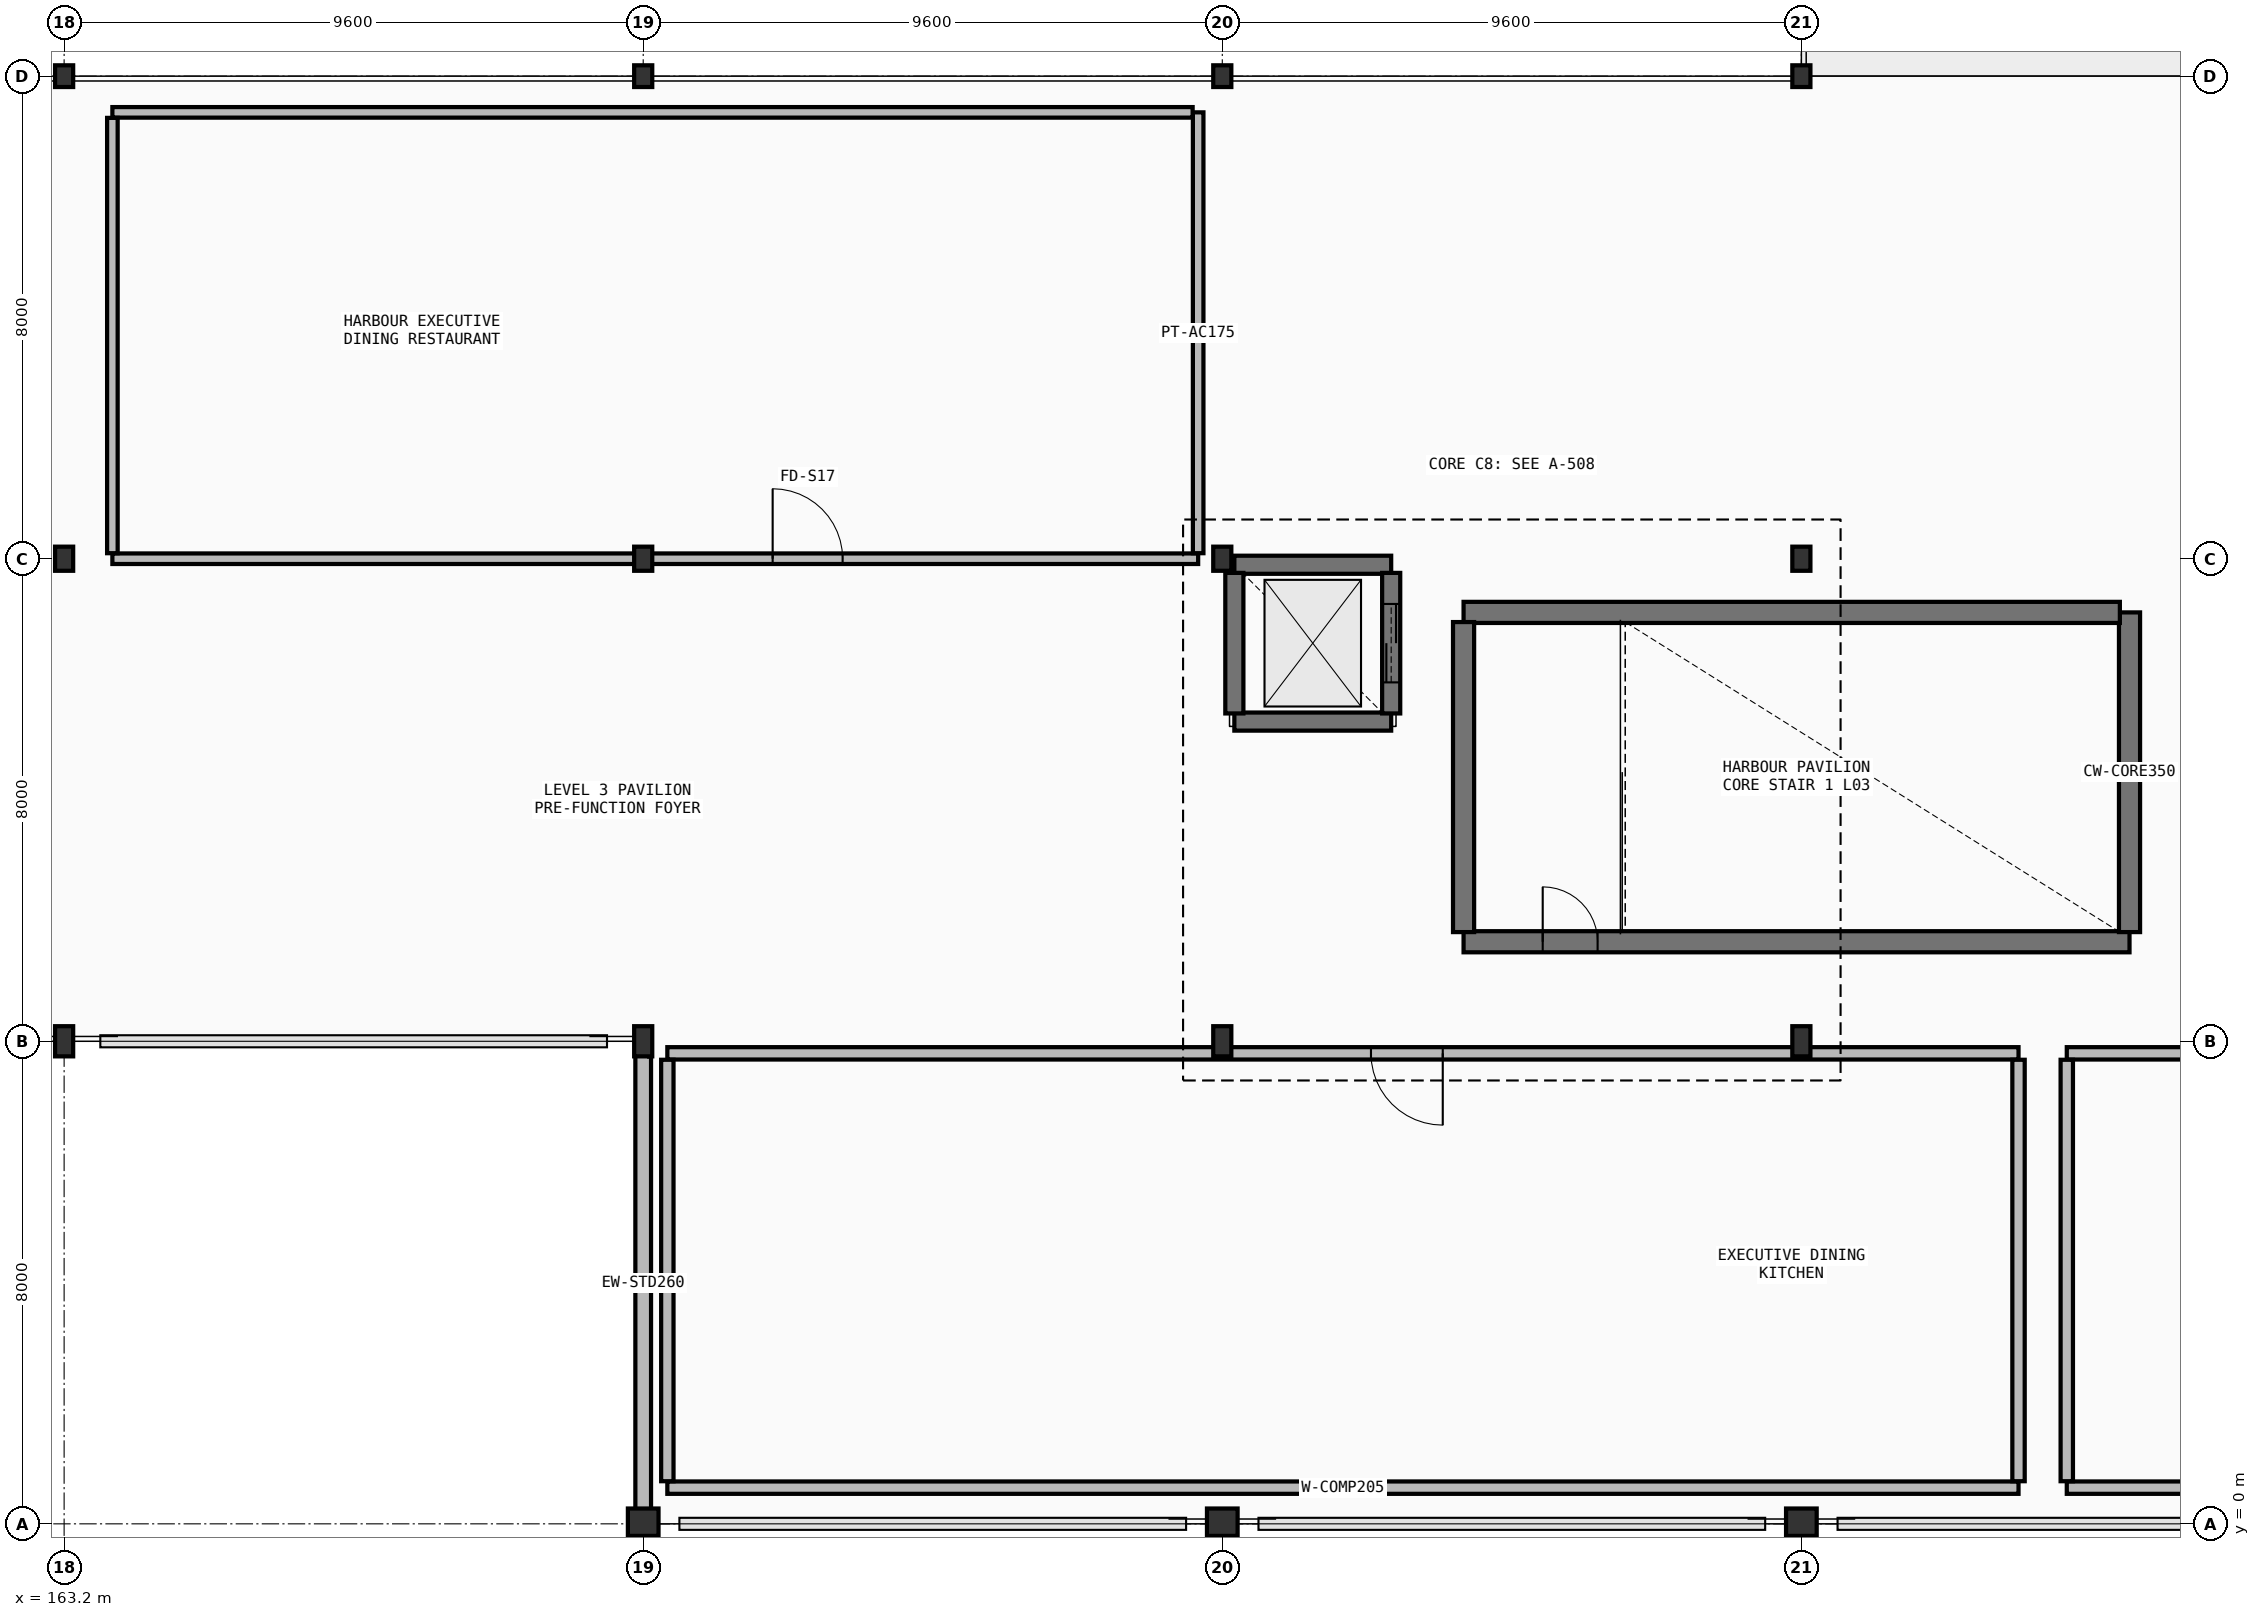
"""IFC4 building model, lengths in metres.
Left out: names, types, materials, properties, quantities, classifications, styles, units other than length and angle.
Written with IfcOpenShell. Run it as: python <this file> out.ifc"""

import sys

from ifc_helpers import new_model, si_unit, direction, frame, frame_2d, origin, origin_2d, place, context, subcontext, project, spatial, rectangle, hollow_circle, i_section, extrude, element, fill, save


model = new_model("IFC4")
c1 = context("Model", 3, precision=1e-05, world=origin(), true_north=direction((0.0, 1.0)))
c2 = subcontext(c1, "Body", "Model", "MODEL_VIEW")
j1 = project(units=[si_unit("LENGTHUNIT", "METRE"), si_unit("PLANEANGLEUNIT", "RADIAN")], contexts=[c1])
p1 = place(None, origin())
s1 = spatial("IfcSite", under=j1, at=p1, CompositionType="ELEMENT")
p2 = place(p1, origin())
s2 = spatial("IfcBuilding", under=s1, at=p2, CompositionType="ELEMENT")
p3 = place(p2, frame((0.0, 0.0, 15.9)))
s3 = spatial("IfcBuildingStorey", under=s2, at=p3, CompositionType="ELEMENT", Elevation=15.9)
p4 = place(p3, frame((163.2, 8.0, 0.0), z_axis=(0.0, 0.0, 1.0), x_axis=(1.0, 0.0, 0.0)))
e1 = element("IfcColumn", 1, at=p4, inside=s3, PredefinedType="COLUMN", context=c2, shape_type="SweptSolid", body=[
    extrude(i_section(OverallWidth=0.3, OverallDepth=0.5, WebThickness=0.014, FlangeThickness=0.028, FilletRadius=0.027, at=origin_2d()), origin(), (0.0, 0.0, 1.0), 4.5),
])
p5 = place(p3, frame((163.2, 16.0, 0.0), z_axis=(0.0, 0.0, 1.0), x_axis=(1.0, 0.0, 0.0)))
e2 = element("IfcColumn", 2, at=p5, inside=s3, PredefinedType="COLUMN", context=c2, shape_type="SweptSolid", body=[
    extrude(i_section(OverallWidth=0.3, OverallDepth=0.4, WebThickness=0.013, FlangeThickness=0.024, FilletRadius=0.027, at=origin_2d()), origin(), (0.0, 0.0, 1.0), 4.5),
])
p6 = place(p3, frame((163.2, 24.0, 0.0), z_axis=(0.0, 0.0, 1.0), x_axis=(1.0, 0.0, 0.0)))
e3 = element("IfcColumn", 3, at=p6, inside=s3, PredefinedType="COLUMN", context=c2, shape_type="SweptSolid", body=[
    extrude(i_section(OverallWidth=0.3, OverallDepth=0.36, WebThickness=0.012, FlangeThickness=0.022, FilletRadius=0.027, at=origin_2d()), origin(), (0.0, 0.0, 1.0), 4.5),
])
p7 = place(p3, frame((172.8, 0.0, 0.0), z_axis=(0.0, 0.0, 1.0), x_axis=(1.0, 0.0, 0.0)))
e4 = element("IfcColumn", 4, at=p7, inside=s3, PredefinedType="COLUMN", context=c2, shape_type="SweptSolid", body=[
    extrude(hollow_circle(Radius=0.254, WallThickness=0.025, at=origin_2d()), origin(), (0.0, 0.0, 1.0), 4.5),
])
p8 = place(p3, frame((172.8, 8.0, 0.0), z_axis=(0.0, 0.0, 1.0), x_axis=(1.0, 0.0, 0.0)))
e5 = element("IfcColumn", 5, at=p8, inside=s3, PredefinedType="COLUMN", context=c2, shape_type="SweptSolid", body=[
    extrude(i_section(OverallWidth=0.3, OverallDepth=0.5, WebThickness=0.014, FlangeThickness=0.028, FilletRadius=0.027, at=origin_2d()), origin(), (0.0, 0.0, 1.0), 4.5),
])
p9 = place(p3, frame((172.8, 16.0, 0.0), z_axis=(0.0, 0.0, 1.0), x_axis=(1.0, 0.0, 0.0)))
e6 = element("IfcColumn", 6, at=p9, inside=s3, PredefinedType="COLUMN", context=c2, shape_type="SweptSolid", body=[
    extrude(i_section(OverallWidth=0.3, OverallDepth=0.4, WebThickness=0.013, FlangeThickness=0.024, FilletRadius=0.027, at=origin_2d()), origin(), (0.0, 0.0, 1.0), 4.5),
])
p10 = place(p3, frame((172.8, 24.0, 0.0), z_axis=(0.0, 0.0, 1.0), x_axis=(1.0, 0.0, 0.0)))
e7 = element("IfcColumn", 7, at=p10, inside=s3, PredefinedType="COLUMN", context=c2, shape_type="SweptSolid", body=[
    extrude(i_section(OverallWidth=0.3, OverallDepth=0.36, WebThickness=0.012, FlangeThickness=0.022, FilletRadius=0.027, at=origin_2d()), origin(), (0.0, 0.0, 1.0), 4.5),
])
p11 = place(p3, frame((182.4, 0.0, 0.0), z_axis=(0.0, 0.0, 1.0), x_axis=(1.0, 0.0, 0.0)))
e8 = element("IfcColumn", 8, at=p11, inside=s3, PredefinedType="COLUMN", context=c2, shape_type="SweptSolid", body=[
    extrude(hollow_circle(Radius=0.254, WallThickness=0.025, at=origin_2d()), origin(), (0.0, 0.0, 1.0), 4.5),
])
p12 = place(p3, frame((182.4, 8.0, 0.0), z_axis=(0.0, 0.0, 1.0), x_axis=(1.0, 0.0, 0.0)))
e9 = element("IfcColumn", 9, at=p12, inside=s3, PredefinedType="COLUMN", context=c2, shape_type="SweptSolid", body=[
    extrude(i_section(OverallWidth=0.3, OverallDepth=0.5, WebThickness=0.014, FlangeThickness=0.028, FilletRadius=0.027, at=origin_2d()), origin(), (0.0, 0.0, 1.0), 4.5),
])
p13 = place(p3, frame((182.4, 16.0, 0.0), z_axis=(0.0, 0.0, 1.0), x_axis=(1.0, 0.0, 0.0)))
e10 = element("IfcColumn", 10, at=p13, inside=s3, PredefinedType="COLUMN", context=c2, shape_type="SweptSolid", body=[
    extrude(i_section(OverallWidth=0.3, OverallDepth=0.4, WebThickness=0.013, FlangeThickness=0.024, FilletRadius=0.027, at=origin_2d()), origin(), (0.0, 0.0, 1.0), 4.5),
])
p14 = place(p3, frame((182.4, 24.0, 0.0), z_axis=(0.0, 0.0, 1.0), x_axis=(1.0, 0.0, 0.0)))
e11 = element("IfcColumn", 11, at=p14, inside=s3, PredefinedType="COLUMN", context=c2, shape_type="SweptSolid", body=[
    extrude(i_section(OverallWidth=0.3, OverallDepth=0.36, WebThickness=0.012, FlangeThickness=0.022, FilletRadius=0.027, at=origin_2d()), origin(), (0.0, 0.0, 1.0), 4.5),
])
p15 = place(p3, frame((192.0, 0.0, 0.0), z_axis=(0.0, 0.0, 1.0), x_axis=(1.0, 0.0, 0.0)))
e12 = element("IfcColumn", 12, at=p15, inside=s3, PredefinedType="COLUMN", context=c2, shape_type="SweptSolid", body=[
    extrude(hollow_circle(Radius=0.254, WallThickness=0.025, at=origin_2d()), origin(), (0.0, 0.0, 1.0), 4.5),
])
p16 = place(p3, frame((192.0, 8.0, 0.0), z_axis=(0.0, 0.0, 1.0), x_axis=(1.0, 0.0, 0.0)))
e13 = element("IfcColumn", 13, at=p16, inside=s3, PredefinedType="COLUMN", context=c2, shape_type="SweptSolid", body=[
    extrude(i_section(OverallWidth=0.3, OverallDepth=0.5, WebThickness=0.014, FlangeThickness=0.028, FilletRadius=0.027, at=origin_2d()), origin(), (0.0, 0.0, 1.0), 4.5),
])
p17 = place(p3, frame((192.0, 16.0, 0.0), z_axis=(0.0, 0.0, 1.0), x_axis=(1.0, 0.0, 0.0)))
e14 = element("IfcColumn", 14, at=p17, inside=s3, PredefinedType="COLUMN", context=c2, shape_type="SweptSolid", body=[
    extrude(i_section(OverallWidth=0.3, OverallDepth=0.4, WebThickness=0.013, FlangeThickness=0.024, FilletRadius=0.027, at=origin_2d()), origin(), (0.0, 0.0, 1.0), 4.5),
])
p18 = place(p3, frame((192.0, 24.0, 0.0), z_axis=(0.0, 0.0, 1.0), x_axis=(1.0, 0.0, 0.0)))
e15 = element("IfcColumn", 15, at=p18, inside=s3, PredefinedType="COLUMN", context=c2, shape_type="SweptSolid", body=[
    extrude(i_section(OverallWidth=0.3, OverallDepth=0.36, WebThickness=0.012, FlangeThickness=0.022, FilletRadius=0.027, at=origin_2d()), origin(), (0.0, 0.0, 1.0), 4.5),
])
p19 = place(p3, frame((172.8, 0.0, 0.0), z_axis=(0.0, 0.0, 1.0), x_axis=(0.0, 1.0, 0.0)))
e16 = element("IfcWall", 16, at=p19, inside=s3, PredefinedType="STANDARD", context=c2, shape_type="SweptSolid", body=[
    extrude(rectangle(XDim=8.0, YDim=0.26, at=frame_2d((4.0, 0.0))), origin(), (0.0, 0.0, 1.0), 3.155),
])
p20 = place(p3, frame((186.4, 9.65, 0.0), z_axis=(0.0, 0.0, 1.0), x_axis=(1.0, 0.0, 0.0)))
e17 = element("IfcWall", 17, at=p20, inside=s3, PredefinedType="SHEAR", context=c2, shape_type="SweptSolid", body=[
    extrude(rectangle(XDim=11.04, YDim=0.35, at=frame_2d((5.52, 0.0))), origin(), (0.0, 0.0, 1.0), 3.835),
])
p21 = place(p20, frame((1.312, 0.0, 0.0)))
e18 = element("IfcOpeningElement", 18, at=p21, cuts=e17, PredefinedType="OPENING", context=c2, shape_type="SweptSolid", body=[
    extrude(rectangle(XDim=0.91, YDim=2.08, at=frame_2d((0.455, 1.04))), frame((0.0, 0.185, 0.0), z_axis=(0.0, -1.0, 0.0), x_axis=(1.0, 0.0, 0.0)), (0.0, 0.0, 1.0), 0.37),
])
p22 = place(p3, frame((197.44, 9.81, 0.0), z_axis=(0.0, 0.0, 1.0), x_axis=(0.0, 1.0, 0.0)))
e19 = element("IfcWall", 19, at=p22, inside=s3, PredefinedType="SHEAR", context=c2, shape_type="SweptSolid", body=[
    extrude(rectangle(XDim=5.3, YDim=0.35, at=frame_2d((2.65, 0.0))), origin(), (0.0, 0.0, 1.0), 3.835),
])
p23 = place(p3, frame((197.28, 15.11, 0.0), z_axis=(0.0, 0.0, 1.0), x_axis=(-1.0, 0.0, 0.0)))
e20 = element("IfcWall", 20, at=p23, inside=s3, PredefinedType="SHEAR", context=c2, shape_type="SweptSolid", body=[
    extrude(rectangle(XDim=10.88, YDim=0.35, at=frame_2d((5.44, 0.0))), origin(), (0.0, 0.0, 1.0), 3.835),
])
p24 = place(p3, frame((186.4, 14.95, 0.0), z_axis=(0.0, 0.0, 1.0), x_axis=(0.0, -1.0, 0.0)))
e21 = element("IfcWall", 21, at=p24, inside=s3, PredefinedType="SHEAR", context=c2, shape_type="SweptSolid", body=[
    extrude(rectangle(XDim=5.14, YDim=0.35, at=frame_2d((2.57, 0.0))), origin(), (0.0, 0.0, 1.0), 3.835),
])
for number, where, z_axis, x_axis in (
    (22, (185.2, 15.9, 0.0), (0.0, 0.0, 1.0), (-1.0, 0.0, 0.0)),
    (23, (182.6, 13.3, 0.0), (0.0, 0.0, 1.0), (1.0, 0.0, 0.0)),
):
    element("IfcWall", number, at=place(p3, frame(where, z_axis=z_axis, x_axis=x_axis)), inside=s3, PredefinedType="SHEAR", context=c2, shape_type="SweptSolid", body=[
        extrude(rectangle(XDim=2.6, YDim=0.3, at=frame_2d((1.3, 0.0))), origin(), (0.0, 0.0, 1.0), 3.835),
    ])
p25 = place(p3, frame((185.2, 13.435, 0.0), z_axis=(0.0, 0.0, 1.0), x_axis=(0.0, 1.0, 0.0)))
e24 = element("IfcWall", 24, at=p25, inside=s3, PredefinedType="SHEAR", context=c2, shape_type="SweptSolid", body=[
    extrude(rectangle(XDim=2.33, YDim=0.3, at=frame_2d((1.165, 0.0))), origin(), (0.0, 0.0, 1.0), 3.835),
])
p26 = place(p25, frame((0.515, 0.0, 0.0)))
e25 = element("IfcOpeningElement", 25, at=p26, cuts=e24, PredefinedType="OPENING", context=c2, shape_type="SweptSolid", body=[
    extrude(rectangle(XDim=1.3, YDim=2.22, at=frame_2d((0.65, 1.11))), frame((0.0, 0.16, 0.0), z_axis=(0.0, -1.0, 0.0), x_axis=(1.0, 0.0, 0.0)), (0.0, 0.0, 1.0), 0.32),
])
p27 = place(p3, frame((182.6, 15.765, 0.0), z_axis=(0.0, 0.0, 1.0), x_axis=(0.0, -1.0, 0.0)))
e26 = element("IfcWall", 26, at=p27, inside=s3, PredefinedType="SHEAR", context=c2, shape_type="SweptSolid", body=[
    extrude(rectangle(XDim=2.33, YDim=0.3, at=frame_2d((1.165, 0.0))), origin(), (0.0, 0.0, 1.0), 3.835),
])
p28 = place(p3, frame((164.0, 16.0, 0.0), z_axis=(0.0, 0.0, 1.0), x_axis=(1.0, 0.0, 0.0)))
e27 = element("IfcWall", 27, at=p28, inside=s3, PredefinedType="PARTITIONING", context=c2, shape_type="SweptSolid", body=[
    extrude(rectangle(XDim=18.0, YDim=0.175, at=frame_2d((9.0, 0.0))), origin(), (0.0, 0.0, 1.0), 2.905),
])
p29 = place(p28, frame((10.946, 0.0, 0.0)))
e28 = element("IfcOpeningElement", 28, at=p29, cuts=e27, PredefinedType="OPENING", context=c2, shape_type="SweptSolid", body=[
    extrude(rectangle(XDim=1.16, YDim=2.32, at=frame_2d((0.58, 1.16))), frame((0.0, 0.097, 0.0), z_axis=(0.0, -1.0, 0.0), x_axis=(1.0, 0.0, 0.0)), (0.0, 0.0, 1.0), 0.195),
])
p30 = place(p3, frame((182.0, 16.092, 0.0), z_axis=(0.0, 0.0, 1.0), x_axis=(0.0, 1.0, 0.0)))
e29 = element("IfcWall", 29, at=p30, inside=s3, PredefinedType="PARTITIONING", context=c2, shape_type="SweptSolid", body=[
    extrude(rectangle(XDim=7.308, YDim=0.175, at=frame_2d((3.654, 0.0))), origin(), (0.0, 0.0, 1.0), 3.835),
])
p31 = place(p3, frame((181.908, 23.4, 0.0), z_axis=(0.0, 0.0, 1.0), x_axis=(-1.0, 0.0, 0.0)))
e30 = element("IfcWall", 30, at=p31, inside=s3, PredefinedType="PARTITIONING", context=c2, shape_type="SweptSolid", body=[
    extrude(rectangle(XDim=17.908, YDim=0.175, at=frame_2d((8.954, 0.0))), origin(), (0.0, 0.0, 1.0), 3.105),
])
p32 = place(p3, frame((164.0, 23.309, 0.0), z_axis=(0.0, 0.0, 1.0), x_axis=(0.0, -1.0, 0.0)))
e31 = element("IfcWall", 31, at=p32, inside=s3, PredefinedType="PARTITIONING", context=c2, shape_type="SweptSolid", body=[
    extrude(rectangle(XDim=7.217, YDim=0.175, at=frame_2d((3.608, 0.0))), origin(), (0.0, 0.0, 1.0), 3.835),
])
p33 = place(p3, frame((195.6, 7.8, 0.0), z_axis=(0.0, 0.0, 1.0), x_axis=(-1.0, 0.0, 0.0)))
e32 = element("IfcWall", 32, at=p33, inside=s3, PredefinedType="SOLIDWALL", context=c2, shape_type="SweptSolid", body=[
    extrude(rectangle(XDim=22.4, YDim=0.205, at=frame_2d((11.2, 0.0))), origin(), (0.0, 0.0, 1.0), 2.905),
])
p34 = place(p33, frame((9.545, 0.0, 0.0)))
e33 = element("IfcOpeningElement", 33, at=p34, cuts=e32, PredefinedType="OPENING", context=c2, shape_type="SweptSolid", body=[
    extrude(rectangle(XDim=1.19, YDim=2.34, at=frame_2d((0.595, 1.17))), frame((0.0, 0.113, 0.0), z_axis=(0.0, -1.0, 0.0), x_axis=(1.0, 0.0, 0.0)), (0.0, 0.0, 1.0), 0.225),
])
p35 = place(p3, frame((173.2, 0.6, 0.0), z_axis=(0.0, 0.0, 1.0), x_axis=(1.0, 0.0, 0.0)))
e34 = element("IfcWall", 34, at=p35, inside=s3, PredefinedType="SOLIDWALL", context=c2, shape_type="SweptSolid", body=[
    extrude(rectangle(XDim=22.4, YDim=0.205, at=frame_2d((11.2, 0.0))), origin(), (0.0, 0.0, 1.0), 2.905),
])
for number, where, z_axis, x_axis in (
    (35, (195.6, 0.707, 0.0), (0.0, 0.0, 1.0), (0.0, 1.0, 0.0)),
    (36, (173.2, 7.694, 0.0), (0.0, 0.0, 1.0), (0.0, -1.0, 0.0)),
):
    element("IfcWall", number, at=place(p3, frame(where, z_axis=z_axis, x_axis=x_axis)), inside=s3, PredefinedType="SOLIDWALL", context=c2, shape_type="SweptSolid", body=[
        extrude(rectangle(XDim=6.987, YDim=0.205, at=frame_2d((3.494, 0.0))), origin(), (0.0, 0.0, 1.0), 3.835),
    ])
p36 = place(p3, frame((210.6, 7.8, 0.0), z_axis=(0.0, 0.0, 1.0), x_axis=(-1.0, 0.0, 0.0)))
e37 = element("IfcWall", 37, at=p36, inside=s3, PredefinedType="SOLIDWALL", context=c2, shape_type="SweptSolid", body=[
    extrude(rectangle(XDim=14.2, YDim=0.205, at=frame_2d((7.1, 0.0))), origin(), (0.0, 0.0, 1.0), 3.205),
])
p37 = place(p36, frame((5.827, 0.0, 0.0)))
e38 = element("IfcOpeningElement", 38, at=p37, cuts=e37, PredefinedType="OPENING", context=c2, shape_type="SweptSolid", body=[
    extrude(rectangle(XDim=1.25, YDim=2.38, at=frame_2d((0.625, 1.19))), frame((0.0, 0.113, 0.0), z_axis=(0.0, -1.0, 0.0), x_axis=(1.0, 0.0, 0.0)), (0.0, 0.0, 1.0), 0.225),
])
p38 = place(p3, frame((196.4, 0.6, 0.0), z_axis=(0.0, 0.0, 1.0), x_axis=(1.0, 0.0, 0.0)))
e39 = element("IfcWall", 39, at=p38, inside=s3, PredefinedType="SOLIDWALL", context=c2, shape_type="SweptSolid", body=[
    extrude(rectangle(XDim=14.2, YDim=0.205, at=frame_2d((7.1, 0.0))), origin(), (0.0, 0.0, 1.0), 3.205),
])
p39 = place(p3, frame((196.4, 7.694, 0.0), z_axis=(0.0, 0.0, 1.0), x_axis=(0.0, -1.0, 0.0)))
e40 = element("IfcWall", 40, at=p39, inside=s3, PredefinedType="SOLIDWALL", context=c2, shape_type="SweptSolid", body=[
    extrude(rectangle(XDim=6.987, YDim=0.205, at=frame_2d((3.494, 0.0))), origin(), (0.0, 0.0, 1.0), 3.835),
])
p40 = place(p21, origin())
e41 = element("IfcDoor", 41, at=p40, inside=s3, OperationType="SINGLE_SWING_LEFT", PredefinedType="DOOR", context=c2, shape_type="SweptSolid", body=[
    extrude(rectangle(XDim=0.91, YDim=2.08, at=frame_2d((0.455, 1.04))), frame((0.0, 0.025, 0.0), z_axis=(0.0, -1.0, 0.0), x_axis=(1.0, 0.0, 0.0)), (0.0, 0.0, 1.0), 0.05),
])
fill(e18, e41)
p41 = place(p26, origin())
e42 = element("IfcDoor", 42, at=p41, inside=s3, OperationType="DOUBLE_DOOR_SLIDING", PredefinedType="DOOR", context=c2, shape_type="SweptSolid", body=[
    extrude(rectangle(XDim=1.3, YDim=2.22, at=frame_2d((0.65, 1.11))), frame((0.0, 0.025, 0.0), z_axis=(0.0, -1.0, 0.0), x_axis=(1.0, 0.0, 0.0)), (0.0, 0.0, 1.0), 0.05),
])
fill(e25, e42)
p42 = place(p29, origin())
e43 = element("IfcDoor", 43, at=p42, inside=s3, OperationType="SINGLE_SWING_RIGHT", PredefinedType="DOOR", context=c2, shape_type="SweptSolid", body=[
    extrude(rectangle(XDim=1.16, YDim=2.32, at=frame_2d((0.58, 1.16))), frame((0.0, 0.025, 0.0), z_axis=(0.0, -1.0, 0.0), x_axis=(1.0, 0.0, 0.0)), (0.0, 0.0, 1.0), 0.05),
])
fill(e28, e43)
p43 = place(p34, origin())
e44 = element("IfcDoor", 44, at=p43, inside=s3, OperationType="SINGLE_SWING_LEFT", PredefinedType="DOOR", context=c2, shape_type="SweptSolid", body=[
    extrude(rectangle(XDim=1.19, YDim=2.34, at=frame_2d((0.595, 1.17))), frame((0.0, 0.025, 0.0), z_axis=(0.0, -1.0, 0.0), x_axis=(1.0, 0.0, 0.0)), (0.0, 0.0, 1.0), 0.05),
])
fill(e33, e44)
save(model, sys.argv[1])
